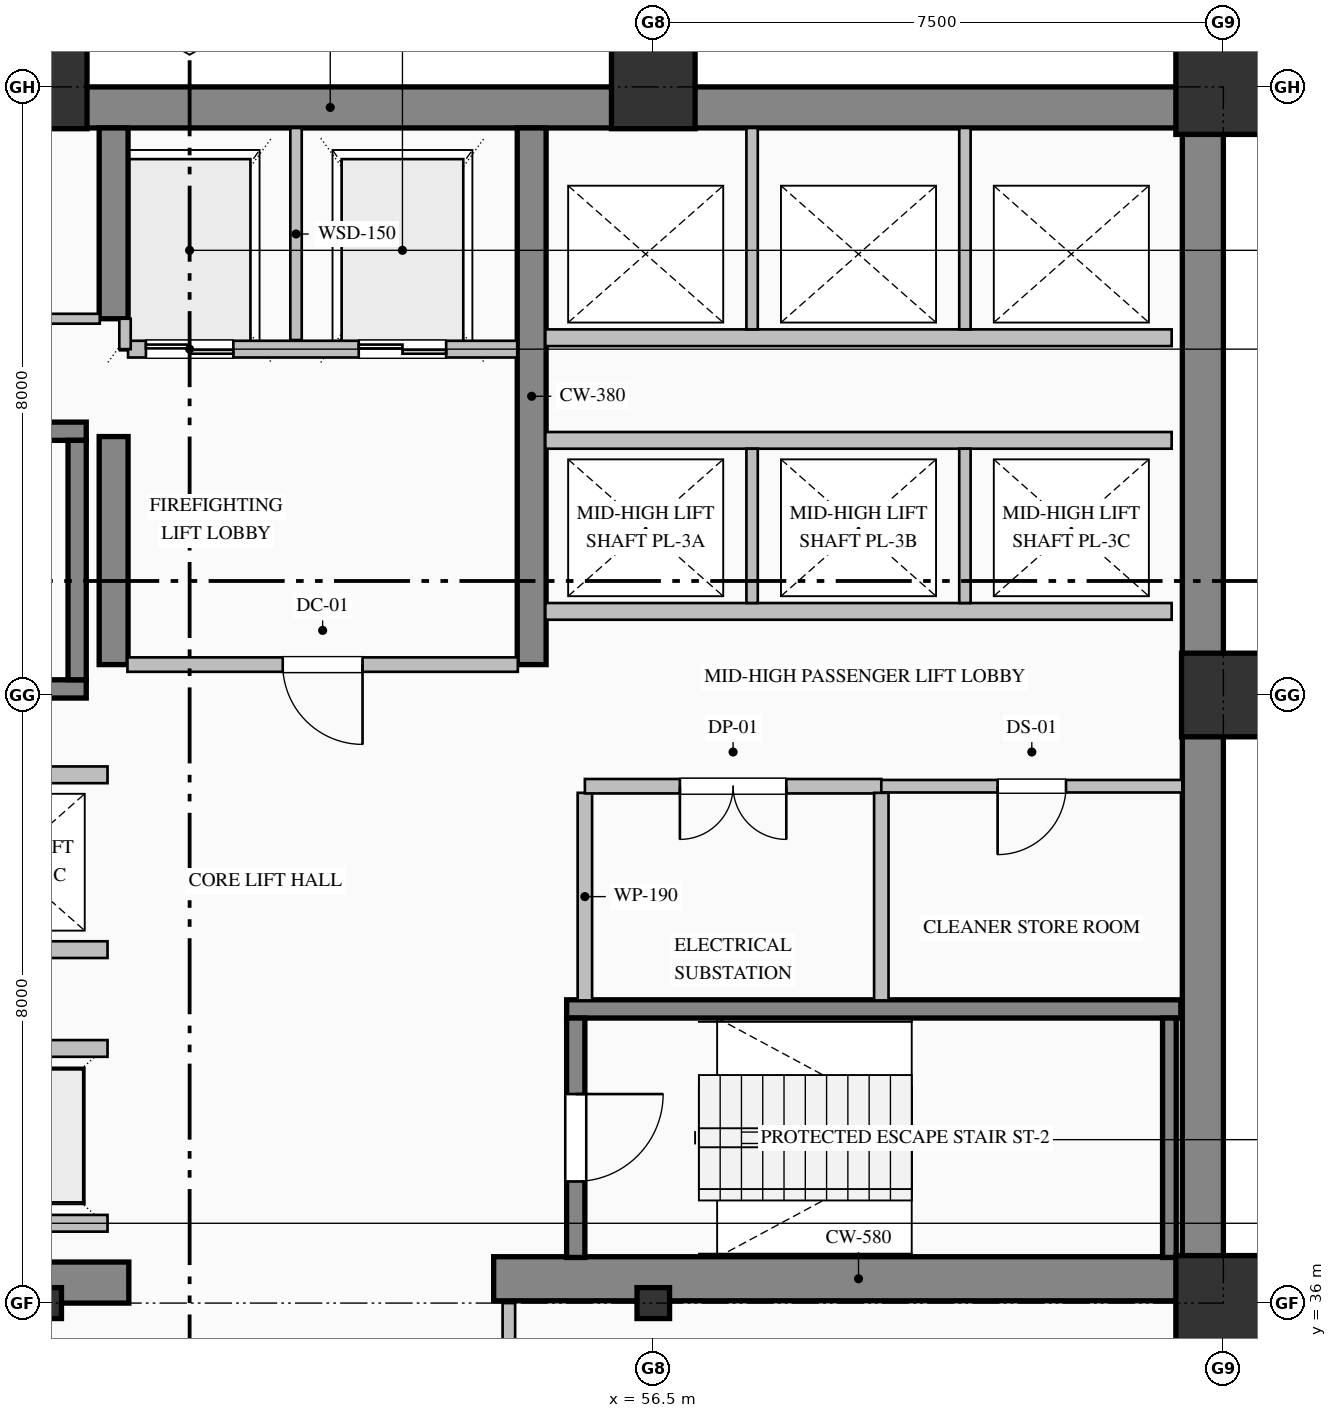
"""IFC4 building model, lengths in metres.
Left out: names, types, materials, properties, quantities, classifications, styles, units other than length and angle.
Written with IfcOpenShell. Run it as: python <this file> out.ifc"""

import sys

from ifc_helpers import new_model, si_unit, direction, frame, frame_2d, origin, origin_2d, place, context, subcontext, project, spatial, rectangle, hollow_rectangle, i_section, extrude, element, fill, save


model = new_model("IFC4")
c1 = context("Model", 3, precision=1e-05, world=origin(), true_north=direction((0.0, 1.0)))
c2 = subcontext(c1, "Body", "Model", "MODEL_VIEW")
j1 = project(units=[si_unit("LENGTHUNIT", "METRE"), si_unit("PLANEANGLEUNIT", "RADIAN")], contexts=[c1])
p1 = place(None, origin())
s1 = spatial("IfcSite", under=j1, at=p1, CompositionType="ELEMENT")
p2 = place(p1, origin())
s2 = spatial("IfcBuilding", under=s1, at=p2, CompositionType="ELEMENT")
p3 = place(p2, frame((0.0, 0.0, 52.2)))
s3 = spatial("IfcBuildingStorey", under=s2, at=p3, CompositionType="ELEMENT", Elevation=52.2)
p4 = place(p3, frame((40.5, 51.73, 0.0), z_axis=(0.0, 0.0, 1.0), x_axis=(1.0, 0.0, 0.0)))
e1 = element("IfcWall", 1, at=p4, inside=s3, PredefinedType="SHEAR", context=c2, shape_type="SweptSolid", body=[
    extrude(rectangle(XDim=23.5, YDim=0.54, at=frame_2d((11.75, 0.0))), origin(), (0.0, 0.0, 1.0), 3.75),
])
p5 = place(p3, frame((63.73, 36.32, 0.0), z_axis=(0.0, 0.0, 1.0), x_axis=(0.0, 1.0, 0.0)))
e2 = element("IfcWall", 2, at=p5, inside=s3, PredefinedType="SHEAR", context=c2, shape_type="SweptSolid", body=[
    extrude(rectangle(XDim=15.14, YDim=0.54, at=frame_2d((7.57, 0.0))), origin(), (0.0, 0.0, 1.0), 3.75),
])
p6 = place(p3, frame((48.2, 36.27, 0.0), z_axis=(0.0, 0.0, 1.0), x_axis=(1.0, 0.0, 0.0)))
e3 = element("IfcWall", 3, at=p6, inside=s3, PredefinedType="SHEAR", context=c2, shape_type="SweptSolid", body=[
    extrude(rectangle(XDim=1.4, YDim=0.54, at=frame_2d((0.7, 0.0))), origin(), (0.0, 0.0, 1.0), 3.75),
])
p7 = place(p3, frame((54.4, 36.32, 0.0), z_axis=(0.0, 0.0, 1.0), x_axis=(1.0, 0.0, 0.0)))
e4 = element("IfcWall", 4, at=p7, inside=s3, PredefinedType="SHEAR", context=c2, shape_type="SweptSolid", body=[
    extrude(rectangle(XDim=9.6, YDim=0.58, at=frame_2d((4.8, 0.0))), origin(), (0.0, 0.0, 1.0), 4.0),
])
p8 = place(p3, frame((49.4, 44.4, 0.0), z_axis=(0.0, 0.0, 1.0), x_axis=(0.0, 1.0, 0.0)))
e5 = element("IfcWall", 5, at=p8, inside=s3, PredefinedType="SHEAR", context=c2, shape_type="SweptSolid", body=[
    extrude(rectangle(XDim=3.0, YDim=0.38, at=frame_2d((1.5, 0.0))), origin(), (0.0, 0.0, 1.0), 3.75),
])
p9 = place(p3, frame((49.4, 48.95, 0.0), z_axis=(0.0, 0.0, 1.0), x_axis=(0.0, 1.0, 0.0)))
e6 = element("IfcWall", 6, at=p9, inside=s3, PredefinedType="SHEAR", context=c2, shape_type="SweptSolid", body=[
    extrude(rectangle(XDim=2.51, YDim=0.38, at=frame_2d((1.255, 0.0))), origin(), (0.0, 0.0, 1.0), 3.75),
])
p10 = place(p3, frame((54.9, 44.4, 0.0), z_axis=(0.0, 0.0, 1.0), x_axis=(0.0, 1.0, 0.0)))
e7 = element("IfcWall", 7, at=p10, inside=s3, PredefinedType="SHEAR", context=c2, shape_type="SweptSolid", body=[
    extrude(rectangle(XDim=7.06, YDim=0.38, at=frame_2d((3.53, 0.0))), origin(), (0.0, 0.0, 1.0), 3.75),
])
p11 = place(p3, frame((48.5, 36.0, 0.0), z_axis=(0.0, 0.0, 1.0), x_axis=(1.0, 0.0, 0.0)))
e8 = element("IfcColumn", 8, at=p11, inside=s3, PredefinedType="COLUMN", context=c2, shape_type="SweptSolid", body=[
    extrude(i_section(OverallWidth=0.407, OverallDepth=0.428, WebThickness=0.02, FlangeThickness=0.035, FilletRadius=0.022, at=origin_2d()), origin(), (0.0, 0.0, 1.0), 4.0),
])
p12 = place(p3, frame((48.5, 52.0, 0.0), z_axis=(0.0, 0.0, 1.0), x_axis=(1.0, 0.0, 0.0)))
e9 = element("IfcColumn", 9, at=p12, inside=s3, PredefinedType="COLUMN", context=c2, shape_type="SweptSolid", body=[
    extrude(hollow_rectangle(XDim=1.1, YDim=1.1, WallThickness=0.04, at=origin_2d()), origin(), (0.0, 0.0, 1.0), 4.0),
])
p13 = place(p3, frame((56.5, 36.0, 0.0), z_axis=(0.0, 0.0, 1.0), x_axis=(1.0, 0.0, 0.0)))
e10 = element("IfcColumn", 10, at=p13, inside=s3, PredefinedType="COLUMN", context=c2, shape_type="SweptSolid", body=[
    extrude(i_section(OverallWidth=0.407, OverallDepth=0.428, WebThickness=0.02, FlangeThickness=0.035, FilletRadius=0.022, at=origin_2d()), origin(), (0.0, 0.0, 1.0), 4.0),
])
p14 = place(p3, frame((56.5, 52.0, 0.0), z_axis=(0.0, 0.0, 1.0), x_axis=(1.0, 0.0, 0.0)))
e11 = element("IfcColumn", 11, at=p14, inside=s3, PredefinedType="COLUMN", context=c2, shape_type="SweptSolid", body=[
    extrude(hollow_rectangle(XDim=1.1, YDim=1.1, WallThickness=0.04, at=origin_2d()), origin(), (0.0, 0.0, 1.0), 4.0),
])
p15 = place(p3, frame((64.0, 36.0, 0.0), z_axis=(0.0, 0.0, 1.0), x_axis=(1.0, 0.0, 0.0)))
e12 = element("IfcColumn", 12, at=p15, inside=s3, PredefinedType="COLUMN", context=c2, shape_type="SweptSolid", body=[
    extrude(hollow_rectangle(XDim=1.25, YDim=1.25, WallThickness=0.045, at=origin_2d()), origin(), (0.0, 0.0, 1.0), 4.0),
])
p16 = place(p3, frame((64.0, 44.0, 0.0), z_axis=(0.0, 0.0, 1.0), x_axis=(1.0, 0.0, 0.0)))
e13 = element("IfcColumn", 13, at=p16, inside=s3, PredefinedType="COLUMN", context=c2, shape_type="SweptSolid", body=[
    extrude(hollow_rectangle(XDim=1.1, YDim=1.1, WallThickness=0.04, at=origin_2d()), origin(), (0.0, 0.0, 1.0), 4.0),
])
p17 = place(p3, frame((64.0, 52.0, 0.0), z_axis=(0.0, 0.0, 1.0), x_axis=(1.0, 0.0, 0.0)))
e14 = element("IfcColumn", 14, at=p17, inside=s3, PredefinedType="COLUMN", context=c2, shape_type="SweptSolid", body=[
    extrude(hollow_rectangle(XDim=1.25, YDim=1.25, WallThickness=0.045, at=origin_2d()), origin(), (0.0, 0.0, 1.0), 4.0),
])
p18 = place(p3, frame((63.83, 36.05, 0.0), z_axis=(0.0, 0.0, 1.0), x_axis=(0.0, -1.0, 0.0)))
e15 = element("IfcWall", 15, at=p18, inside=s3, PredefinedType="SOLIDWALL", context=c2, shape_type="SweptSolid", body=[
    extrude(rectangle(XDim=28.05, YDim=0.34, at=frame_2d((14.025, 0.0))), origin(), (0.0, 0.0, 1.0), 3.25),
])
p19 = place(p18, frame((2.7, 0.0, 0.85)))
e16 = element("IfcOpeningElement", 16, at=p19, cuts=e15, PredefinedType="OPENING", context=c2, shape_type="SweptSolid", body=[
    extrude(rectangle(XDim=1.8, YDim=2.05, at=frame_2d((0.9, 1.025))), frame((0.0, 0.18, 0.0), z_axis=(0.0, -1.0, 0.0), x_axis=(1.0, 0.0, 0.0)), (0.0, 0.0, 1.0), 0.36),
])
p20 = place(p18, frame((9.6, 0.0, 0.8)))
e17 = element("IfcOpeningElement", 17, at=p20, cuts=e15, PredefinedType="OPENING", context=c2, shape_type="SweptSolid", body=[
    extrude(rectangle(XDim=2.4, YDim=2.15, at=frame_2d((1.2, 1.075))), frame((0.0, 0.18, 0.0), z_axis=(0.0, -1.0, 0.0), x_axis=(1.0, 0.0, 0.0)), (0.0, 0.0, 1.0), 0.36),
])
p21 = place(p18, frame((13.5, 0.0, 0.85)))
e18 = element("IfcOpeningElement", 18, at=p21, cuts=e15, PredefinedType="OPENING", context=c2, shape_type="SweptSolid", body=[
    extrude(rectangle(XDim=1.8, YDim=2.05, at=frame_2d((0.9, 1.025))), frame((0.0, 0.18, 0.0), z_axis=(0.0, -1.0, 0.0), x_axis=(1.0, 0.0, 0.0)), (0.0, 0.0, 1.0), 0.36),
])
for number, where, z_axis, x_axis in (
    (19, (40.96, 47.47, 0.0), (0.0, 0.0, 1.0), (1.0, 0.0, 0.0)),
    (20, (49.04, 44.08, 0.0), (0.0, 0.0, 1.0), (-1.0, 0.0, 0.0)),
):
    element("IfcWall", number, at=place(p3, frame(where, z_axis=z_axis, x_axis=x_axis)), inside=s3, PredefinedType="SOLIDWALL", context=c2, shape_type="SweptSolid", body=[
        extrude(rectangle(XDim=8.08, YDim=0.24, at=frame_2d((4.04, 0.0))), origin(), (0.0, 0.0, 1.0), 4.0),
    ])
p22 = place(p3, frame((48.92, 44.2, 0.0), z_axis=(0.0, 0.0, 1.0), x_axis=(0.0, 1.0, 0.0)))
e21 = element("IfcWall", 21, at=p22, inside=s3, PredefinedType="SOLIDWALL", context=c2, shape_type="SweptSolid", body=[
    extrude(rectangle(XDim=3.15, YDim=0.24, at=frame_2d((1.575, 0.0))), origin(), (0.0, 0.0, 1.0), 4.0),
])
p23 = place(p3, frame((55.36, 39.87, 0.0), z_axis=(0.0, 0.0, 1.0), x_axis=(1.0, 0.0, 0.0)))
e22 = element("IfcWall", 22, at=p23, inside=s3, PredefinedType="SOLIDWALL", context=c2, shape_type="SweptSolid", body=[
    extrude(rectangle(XDim=8.08, YDim=0.24, at=frame_2d((4.04, 0.0))), origin(), (0.0, 0.0, 1.0), 4.0),
])
p24 = place(p3, frame((55.48, 39.75, 0.0), z_axis=(0.0, 0.0, 1.0), x_axis=(0.0, -1.0, 0.0)))
e23 = element("IfcWall", 23, at=p24, inside=s3, PredefinedType="SOLIDWALL", context=c2, shape_type="SweptSolid", body=[
    extrude(rectangle(XDim=3.15, YDim=0.24, at=frame_2d((1.575, 0.0))), origin(), (0.0, 0.0, 1.0), 4.0),
])
p25 = place(p24, frame((1.0, 0.0, 0.0)))
e24 = element("IfcOpeningElement", 24, at=p25, cuts=e23, PredefinedType="OPENING", context=c2, shape_type="SweptSolid", body=[
    extrude(rectangle(XDim=1.15, YDim=2.2, at=frame_2d((0.575, 1.1))), frame((0.0, 0.13, 0.0), z_axis=(0.0, -1.0, 0.0), x_axis=(1.0, 0.0, 0.0)), (0.0, 0.0, 1.0), 0.26),
])
p26 = place(p3, frame((63.29, 36.6, 0.0), z_axis=(0.0, 0.0, 1.0), x_axis=(0.0, 1.0, 0.0)))
e25 = element("IfcWall", 25, at=p26, inside=s3, PredefinedType="SOLIDWALL", context=c2, shape_type="SweptSolid", body=[
    extrude(rectangle(XDim=3.15, YDim=0.18, at=frame_2d((1.575, 0.0))), origin(), (0.0, 0.0, 1.0), 4.0),
])
p27 = place(p3, frame((54.71, 48.55, 0.0), z_axis=(0.0, 0.0, 1.0), x_axis=(-1.0, 0.0, 0.0)))
e26 = element("IfcWall", 26, at=p27, inside=s3, PredefinedType="PARTITIONING", context=c2, shape_type="SweptSolid", body=[
    extrude(rectangle(XDim=5.12, YDim=0.22, at=frame_2d((2.56, 0.0))), origin(), (0.0, 0.0, 1.0), 3.75),
])
p28 = place(p27, frame((3.735, 0.0, 0.0)))
e27 = element("IfcOpeningElement", 27, at=p28, cuts=e26, PredefinedType="OPENING", context=c2, shape_type="SweptSolid", body=[
    extrude(rectangle(XDim=1.15, YDim=2.2, at=frame_2d((0.575, 1.1))), frame((0.0, 0.12, 0.0), z_axis=(0.0, -1.0, 0.0), x_axis=(1.0, 0.0, 0.0)), (0.0, 0.0, 1.0), 0.24),
])
p29 = place(p27, frame((0.935, 0.0, 0.0)))
e28 = element("IfcOpeningElement", 28, at=p29, cuts=e26, PredefinedType="OPENING", context=c2, shape_type="SweptSolid", body=[
    extrude(rectangle(XDim=1.15, YDim=2.2, at=frame_2d((0.575, 1.1))), frame((0.0, 0.12, 0.0), z_axis=(0.0, -1.0, 0.0), x_axis=(1.0, 0.0, 0.0)), (0.0, 0.0, 1.0), 0.24),
])
p30 = place(p3, frame((51.8, 48.67, 0.0), z_axis=(0.0, 0.0, 1.0), x_axis=(0.0, 1.0, 0.0)))
e29 = element("IfcWall", 29, at=p30, inside=s3, PredefinedType="PARTITIONING", context=c2, shape_type="SweptSolid", body=[
    extrude(rectangle(XDim=2.79, YDim=0.15, at=frame_2d((1.395, 0.0))), origin(), (0.0, 0.0, 1.0), 3.75),
])
p31 = place(p3, frame((49.55, 48.55, 0.0), z_axis=(0.0, 0.0, 1.0), x_axis=(0.0, 1.0, 0.0)))
e30 = element("IfcWall", 30, at=p31, inside=s3, PredefinedType="PARTITIONING", context=c2, shape_type="SweptSolid", body=[
    extrude(rectangle(XDim=0.4, YDim=0.15, at=frame_2d((0.2, 0.0))), origin(), (0.0, 0.0, 1.0), 3.75),
])
p32 = place(p3, frame((49.32, 37.05, 0.0), z_axis=(0.0, 0.0, 1.0), x_axis=(-1.0, 0.0, 0.0)))
e31 = element("IfcWall", 31, at=p32, inside=s3, PredefinedType="PARTITIONING", context=c2, shape_type="SweptSolid", body=[
    extrude(rectangle(XDim=8.24, YDim=0.22, at=frame_2d((4.12, 0.0))), origin(), (0.0, 0.0, 1.0), 3.75),
])
p33 = place(p32, frame((6.37, 0.0, 0.0)))
e32 = element("IfcOpeningElement", 32, at=p33, cuts=e31, PredefinedType="OPENING", context=c2, shape_type="SweptSolid", body=[
    extrude(rectangle(XDim=1.1, YDim=2.2, at=frame_2d((0.55, 1.1))), frame((0.0, 0.12, 0.0), z_axis=(0.0, -1.0, 0.0), x_axis=(1.0, 0.0, 0.0)), (0.0, 0.0, 1.0), 0.24),
])
p34 = place(p32, frame((3.57, 0.0, 0.0)))
e33 = element("IfcOpeningElement", 33, at=p34, cuts=e31, PredefinedType="OPENING", context=c2, shape_type="SweptSolid", body=[
    extrude(rectangle(XDim=1.1, YDim=2.2, at=frame_2d((0.55, 1.1))), frame((0.0, 0.12, 0.0), z_axis=(0.0, -1.0, 0.0), x_axis=(1.0, 0.0, 0.0)), (0.0, 0.0, 1.0), 0.24),
])
p35 = place(p32, frame((0.77, 0.0, 0.0)))
e34 = element("IfcOpeningElement", 34, at=p35, cuts=e31, PredefinedType="OPENING", context=c2, shape_type="SweptSolid", body=[
    extrude(rectangle(XDim=1.1, YDim=2.2, at=frame_2d((0.55, 1.1))), frame((0.0, 0.12, 0.0), z_axis=(0.0, -1.0, 0.0), x_axis=(1.0, 0.0, 0.0)), (0.0, 0.0, 1.0), 0.24),
])
for number, where, z_axis, x_axis in (
    (35, (41.08, 39.35, 0.0), (0.0, 0.0, 1.0), (1.0, 0.0, 0.0)),
    (36, (49.32, 40.65, 0.0), (0.0, 0.0, 1.0), (-1.0, 0.0, 0.0)),
    (37, (41.08, 42.95, 0.0), (0.0, 0.0, 1.0), (1.0, 0.0, 0.0)),
    (38, (63.32, 45.1, 0.0), (0.0, 0.0, 1.0), (-1.0, 0.0, 0.0)),
    (39, (55.08, 47.35, 0.0), (0.0, 0.0, 1.0), (1.0, 0.0, 0.0)),
):
    element("IfcWall", number, at=place(p3, frame(where, z_axis=z_axis, x_axis=x_axis)), inside=s3, PredefinedType="PARTITIONING", context=c2, shape_type="SweptSolid", body=[
        extrude(rectangle(XDim=8.24, YDim=0.22, at=frame_2d((4.12, 0.0))), origin(), (0.0, 0.0, 1.0), 3.75),
    ])
for number, where, z_axis, x_axis in (
    (40, (57.8, 45.21, 0.0), (0.0, 0.0, 1.0), (0.0, 1.0, 0.0)),
    (41, (60.6, 45.21, 0.0), (0.0, 0.0, 1.0), (0.0, 1.0, 0.0)),
):
    element("IfcWall", number, at=place(p3, frame(where, z_axis=z_axis, x_axis=x_axis)), inside=s3, PredefinedType="PARTITIONING", context=c2, shape_type="SweptSolid", body=[
        extrude(rectangle(XDim=2.03, YDim=0.15, at=frame_2d((1.015, 0.0))), origin(), (0.0, 0.0, 1.0), 3.75),
    ])
p36 = place(p3, frame((63.32, 48.7, 0.0), z_axis=(0.0, 0.0, 1.0), x_axis=(-1.0, 0.0, 0.0)))
e42 = element("IfcWall", 42, at=p36, inside=s3, PredefinedType="PARTITIONING", context=c2, shape_type="SweptSolid", body=[
    extrude(rectangle(XDim=8.24, YDim=0.22, at=frame_2d((4.12, 0.0))), origin(), (0.0, 0.0, 1.0), 3.75),
])
for number, where, z_axis, x_axis in (
    (43, (57.8, 48.81, 0.0), (0.0, 0.0, 1.0), (0.0, 1.0, 0.0)),
    (44, (60.6, 48.81, 0.0), (0.0, 0.0, 1.0), (0.0, 1.0, 0.0)),
):
    element("IfcWall", number, at=place(p3, frame(where, z_axis=z_axis, x_axis=x_axis)), inside=s3, PredefinedType="PARTITIONING", context=c2, shape_type="SweptSolid", body=[
        extrude(rectangle(XDim=2.65, YDim=0.15, at=frame_2d((1.325, 0.0))), origin(), (0.0, 0.0, 1.0), 3.75),
    ])
p37 = place(p3, frame((45.2, 48.95, 0.0), z_axis=(0.0, 0.0, 1.0), x_axis=(1.0, 0.0, 0.0)))
e45 = element("IfcWall", 45, at=p37, inside=s3, PredefinedType="PARTITIONING", context=c2, shape_type="SweptSolid", body=[
    extrude(rectangle(XDim=4.018, YDim=0.13, at=frame_2d((2.009, 0.0))), origin(), (0.0, 0.0, 1.0), 3.75),
])
p38 = place(p37, frame((1.549, 0.0, 0.0)))
e46 = element("IfcOpeningElement", 46, at=p38, cuts=e45, PredefinedType="OPENING", context=c2, shape_type="SweptSolid", body=[
    extrude(rectangle(XDim=0.92, YDim=2.15, at=frame_2d((0.46, 1.075))), frame((0.0, 0.075, 0.0), z_axis=(0.0, -1.0, 0.0), x_axis=(1.0, 0.0, 0.0)), (0.0, 0.0, 1.0), 0.15),
])
p39 = place(p3, frame((54.718, 44.4, 0.0), z_axis=(0.0, 0.0, 1.0), x_axis=(-1.0, 0.0, 0.0)))
e47 = element("IfcWall", 47, at=p39, inside=s3, PredefinedType="PARTITIONING", context=c2, shape_type="SweptSolid", body=[
    extrude(rectangle(XDim=5.136, YDim=0.19, at=frame_2d((2.568, 0.0))), origin(), (0.0, 0.0, 1.0), 3.75),
])
p40 = place(p39, frame((2.043, 0.0, 0.0)))
e48 = element("IfcOpeningElement", 48, at=p40, cuts=e47, PredefinedType="OPENING", context=c2, shape_type="SweptSolid", body=[
    extrude(rectangle(XDim=1.05, YDim=2.15, at=frame_2d((0.525, 1.075))), frame((0.0, 0.105, 0.0), z_axis=(0.0, -1.0, 0.0), x_axis=(1.0, 0.0, 0.0)), (0.0, 0.0, 1.0), 0.21),
])
p41 = place(p3, frame((55.6, 42.713, 0.0), z_axis=(0.0, 0.0, 1.0), x_axis=(0.0, -1.0, 0.0)))
e49 = element("IfcWall", 49, at=p41, inside=s3, PredefinedType="PARTITIONING", context=c2, shape_type="SweptSolid", body=[
    extrude(rectangle(XDim=2.731, YDim=0.19, at=frame_2d((1.365, 0.0))), origin(), (0.0, 0.0, 1.0), 3.75),
])
p42 = place(p3, frame((59.5, 42.8, 0.0), z_axis=(0.0, 0.0, 1.0), x_axis=(-1.0, 0.0, 0.0)))
e50 = element("IfcWall", 50, at=p42, inside=s3, PredefinedType="PARTITIONING", context=c2, shape_type="SweptSolid", body=[
    extrude(rectangle(XDim=3.9, YDim=0.19, at=frame_2d((1.95, 0.0))), origin(), (0.0, 0.0, 1.0), 3.75),
])
p43 = place(p42, frame((1.25, 0.0, 0.0)))
e51 = element("IfcOpeningElement", 51, at=p43, cuts=e50, PredefinedType="OPENING", context=c2, shape_type="SweptSolid", body=[
    extrude(rectangle(XDim=1.4, YDim=2.25, at=frame_2d((0.7, 1.125))), frame((0.0, 0.105, 0.0), z_axis=(0.0, -1.0, 0.0), x_axis=(1.0, 0.0, 0.0)), (0.0, 0.0, 1.0), 0.21),
])
p44 = place(p3, frame((63.46, 42.8, 0.0), z_axis=(0.0, 0.0, 1.0), x_axis=(-1.0, 0.0, 0.0)))
e52 = element("IfcWall", 52, at=p44, inside=s3, PredefinedType="PARTITIONING", context=c2, shape_type="SweptSolid", body=[
    extrude(rectangle(XDim=3.96, YDim=0.165, at=frame_2d((1.98, 0.0))), origin(), (0.0, 0.0, 1.0), 3.75),
])
p45 = place(p44, frame((1.53, 0.0, 0.0)))
e53 = element("IfcOpeningElement", 53, at=p45, cuts=e52, PredefinedType="OPENING", context=c2, shape_type="SweptSolid", body=[
    extrude(rectangle(XDim=0.9, YDim=2.15, at=frame_2d((0.45, 1.075))), frame((0.0, 0.093, 0.0), z_axis=(0.0, -1.0, 0.0), x_axis=(1.0, 0.0, 0.0)), (0.0, 0.0, 1.0), 0.185),
])
p46 = place(p3, frame((59.5, 42.713, 0.0), z_axis=(0.0, 0.0, 1.0), x_axis=(0.0, -1.0, 0.0)))
e54 = element("IfcWall", 54, at=p46, inside=s3, PredefinedType="PARTITIONING", context=c2, shape_type="SweptSolid", body=[
    extrude(rectangle(XDim=2.731, YDim=0.19, at=frame_2d((1.365, 0.0))), origin(), (0.0, 0.0, 1.0), 3.75),
])
p47 = place(p3, frame((54.6, 36.0, 0.0), z_axis=(0.0, 0.0, 1.0), x_axis=(0.0, -1.0, 0.0)))
e55 = element("IfcWall", 55, at=p47, inside=s3, PredefinedType="PARTITIONING", context=c2, shape_type="SweptSolid", body=[
    extrude(rectangle(XDim=2.125, YDim=0.165, at=frame_2d((1.063, 0.0))), origin(), (0.0, 0.0, 1.0), 3.75),
])
p48 = place(p25, origin())
e56 = element("IfcDoor", 56, at=p48, inside=s3, OperationType="SINGLE_SWING_LEFT", PredefinedType="DOOR", context=c2, shape_type="SweptSolid", body=[
    extrude(rectangle(XDim=1.15, YDim=2.2, at=frame_2d((0.575, 1.1))), frame((0.0, 0.025, 0.0), z_axis=(0.0, -1.0, 0.0), x_axis=(1.0, 0.0, 0.0)), (0.0, 0.0, 1.0), 0.05),
])
fill(e24, e56)
p49 = place(p28, origin())
e57 = element("IfcDoor", 57, at=p49, inside=s3, OperationType="DOUBLE_DOOR_SLIDING", PredefinedType="DOOR", context=c2, shape_type="SweptSolid", body=[
    extrude(rectangle(XDim=1.15, YDim=2.2, at=frame_2d((0.575, 1.1))), frame((0.0, 0.025, 0.0), z_axis=(0.0, -1.0, 0.0), x_axis=(1.0, 0.0, 0.0)), (0.0, 0.0, 1.0), 0.05),
])
fill(e27, e57)
p50 = place(p29, origin())
e58 = element("IfcDoor", 58, at=p50, inside=s3, OperationType="DOUBLE_DOOR_SLIDING", PredefinedType="DOOR", context=c2, shape_type="SweptSolid", body=[
    extrude(rectangle(XDim=1.15, YDim=2.2, at=frame_2d((0.575, 1.1))), frame((0.0, 0.025, 0.0), z_axis=(0.0, -1.0, 0.0), x_axis=(1.0, 0.0, 0.0)), (0.0, 0.0, 1.0), 0.05),
])
fill(e28, e58)
p51 = place(p40, origin())
e59 = element("IfcDoor", 59, at=p51, inside=s3, OperationType="SINGLE_SWING_LEFT", PredefinedType="DOOR", context=c2, shape_type="SweptSolid", body=[
    extrude(rectangle(XDim=1.05, YDim=2.15, at=frame_2d((0.525, 1.075))), frame((0.0, 0.025, 0.0), z_axis=(0.0, -1.0, 0.0), x_axis=(1.0, 0.0, 0.0)), (0.0, 0.0, 1.0), 0.05),
])
fill(e48, e59)
p52 = place(p43, origin())
e60 = element("IfcDoor", 60, at=p52, inside=s3, OperationType="DOUBLE_DOOR_SINGLE_SWING", PredefinedType="DOOR", context=c2, shape_type="SweptSolid", body=[
    extrude(rectangle(XDim=1.4, YDim=2.25, at=frame_2d((0.7, 1.125))), frame((0.0, 0.025, 0.0), z_axis=(0.0, -1.0, 0.0), x_axis=(1.0, 0.0, 0.0)), (0.0, 0.0, 1.0), 0.05),
])
fill(e51, e60)
p53 = place(p45, origin())
e61 = element("IfcDoor", 61, at=p53, inside=s3, OperationType="SINGLE_SWING_RIGHT", PredefinedType="DOOR", context=c2, shape_type="SweptSolid", body=[
    extrude(rectangle(XDim=0.9, YDim=2.15, at=frame_2d((0.45, 1.075))), frame((0.0, 0.025, 0.0), z_axis=(0.0, -1.0, 0.0), x_axis=(1.0, 0.0, 0.0)), (0.0, 0.0, 1.0), 0.05),
])
fill(e53, e61)
save(model, sys.argv[1])
